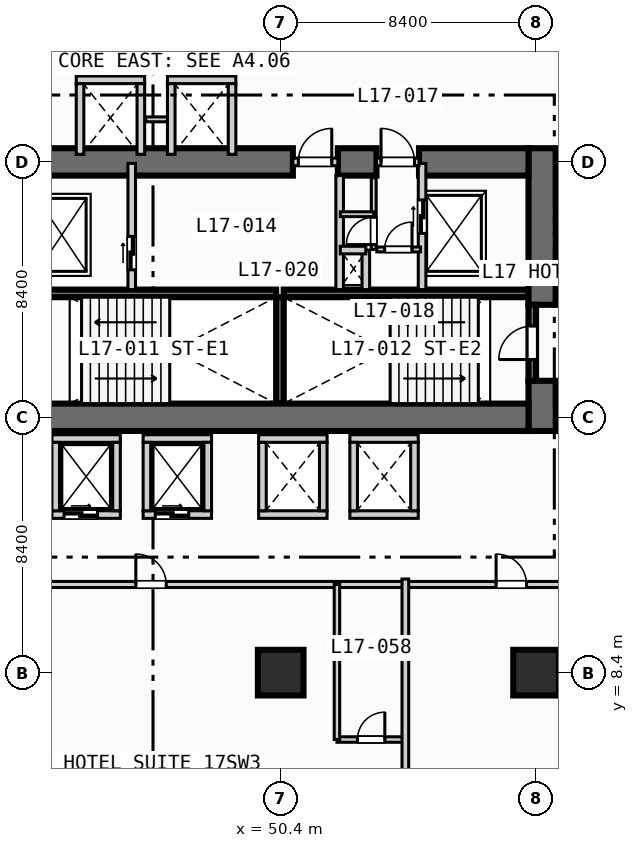
"""IFC4 building model, lengths in metres.
Left out: names, types, materials, properties, quantities, classifications, styles, units other than length and angle.
Written with IfcOpenShell. Run it as: python <this file> out.ifc"""

import sys

from ifc_helpers import new_model, si_unit, direction, frame, frame_2d, origin, origin_2d, place, context, subcontext, project, spatial, rectangle, extrude, element, fill, save


model = new_model("IFC4")
c1 = context("Model", 3, precision=1e-05, world=origin(), true_north=direction((0.0, 1.0)))
c2 = subcontext(c1, "Body", "Model", "MODEL_VIEW")
j1 = project(units=[si_unit("LENGTHUNIT", "METRE"), si_unit("PLANEANGLEUNIT", "RADIAN")], contexts=[c1])
p1 = place(None, origin())
s1 = spatial("IfcSite", under=j1, at=p1, CompositionType="ELEMENT")
p2 = place(p1, origin())
s2 = spatial("IfcBuilding", under=s1, at=p2, CompositionType="ELEMENT")
p3 = place(p2, frame((0.0, 0.0, 73.8)))
s3 = spatial("IfcBuildingStorey", under=s2, at=p3, CompositionType="ELEMENT", Elevation=73.8)
for number, where, z_axis, x_axis in (
    (1, (42.2, 20.875, 0.0), (0.0, 0.0, 1.0), (1.0, 0.0, 0.0)),
    (2, (50.5, 20.875, 0.0), (0.0, 0.0, 1.0), (1.0, 0.0, 0.0)),
):
    element("IfcWall", number, at=place(p3, frame(where, z_axis=z_axis, x_axis=x_axis)), inside=s3, PredefinedType="SOLIDWALL", context=c2, shape_type="SweptSolid", body=[
        extrude(rectangle(XDim=8.05, YDim=0.25, at=frame_2d((4.025, 0.0))), origin(), (0.0, 0.0, 1.0), 3.55),
    ])
p4 = place(p3, frame((50.375, 17.25, 0.0), z_axis=(0.0, 0.0, 1.0), x_axis=(0.0, 1.0, 0.0)))
e3 = element("IfcWall", 3, at=p4, inside=s3, PredefinedType="SOLIDWALL", context=c2, shape_type="SweptSolid", body=[
    extrude(rectangle(XDim=3.5, YDim=0.25, at=frame_2d((1.75, 0.0))), origin(), (0.0, 0.0, 1.0), 3.55),
])
p5 = place(p3, frame((59.0, 16.35, 0.0), z_axis=(0.0, 0.0, 1.0), x_axis=(0.0, 1.0, 0.0)))
e4 = element("IfcWall", 4, at=p5, inside=s3, PredefinedType="SHEAR", context=c2, shape_type="SweptSolid", body=[
    extrude(rectangle(XDim=1.65, YDim=0.9, at=frame_2d((0.825, 0.0))), origin(), (0.0, 0.0, 1.0), 3.55),
])
p6 = place(p3, frame((59.0, 20.5, 0.0), z_axis=(0.0, 0.0, 1.0), x_axis=(0.0, 1.0, 0.0)))
e5 = element("IfcWall", 5, at=p6, inside=s3, PredefinedType="SHEAR", context=c2, shape_type="SweptSolid", body=[
    extrude(rectangle(XDim=5.15, YDim=0.9, at=frame_2d((2.575, 0.0))), origin(), (0.0, 0.0, 1.0), 3.55),
])
p7 = place(p3, frame((42.2, 16.8, 0.0), z_axis=(0.0, 0.0, 1.0), x_axis=(1.0, 0.0, 0.0)))
e6 = element("IfcWall", 6, at=p7, inside=s3, PredefinedType="SHEAR", context=c2, shape_type="SweptSolid", body=[
    extrude(rectangle(XDim=16.35, YDim=0.9, at=frame_2d((8.175, 0.0))), origin(), (0.0, 0.0, 1.0), 3.55),
])
p8 = place(p3, frame((42.2, 25.2, 0.0), z_axis=(0.0, 0.0, 1.0), x_axis=(1.0, 0.0, 0.0)))
e7 = element("IfcWall", 7, at=p8, inside=s3, PredefinedType="SHEAR", context=c2, shape_type="SweptSolid", body=[
    extrude(rectangle(XDim=8.6, YDim=0.9, at=frame_2d((4.3, 0.0))), origin(), (0.0, 0.0, 1.0), 3.55),
])
p9 = place(p3, frame((52.28, 25.2, 0.0), z_axis=(0.0, 0.0, 1.0), x_axis=(1.0, 0.0, 0.0)))
e8 = element("IfcWall", 8, at=p9, inside=s3, PredefinedType="SHEAR", context=c2, shape_type="SweptSolid", body=[
    extrude(rectangle(XDim=1.27, YDim=0.9, at=frame_2d((0.635, 0.0))), origin(), (0.0, 0.0, 1.0), 3.55),
])
p10 = place(p3, frame((54.95, 25.2, 0.0), z_axis=(0.0, 0.0, 1.0), x_axis=(1.0, 0.0, 0.0)))
e9 = element("IfcWall", 9, at=p10, inside=s3, PredefinedType="SHEAR", context=c2, shape_type="SweptSolid", body=[
    extrude(rectangle(XDim=3.6, YDim=0.9, at=frame_2d((1.8, 0.0))), origin(), (0.0, 0.0, 1.0), 3.55),
])
for number, where, z_axis, x_axis in (
    (10, (50.4, 8.4, 0.0), (0.0, 0.0, 1.0), (1.0, 0.0, 0.0)),
    (11, (58.8, 8.4, 0.0), (0.0, 0.0, 1.0), (1.0, 0.0, 0.0)),
):
    element("IfcColumn", number, at=place(p3, frame(where, z_axis=z_axis, x_axis=x_axis)), inside=s3, PredefinedType="COLUMN", context=c2, shape_type="SweptSolid", body=[
        extrude(rectangle(XDim=1.5, YDim=1.5, at=origin_2d()), origin(), (0.0, 0.0, 1.0), 3.8),
    ])
p11 = place(p3, frame((58.675, 18.0, 0.0), z_axis=(0.0, 0.0, 1.0), x_axis=(0.0, 1.0, 0.0)))
e12 = element("IfcWall", 12, at=p11, inside=s3, PredefinedType="SOLIDWALL", context=c2, shape_type="SweptSolid", body=[
    extrude(rectangle(XDim=2.5, YDim=0.25, at=frame_2d((1.25, 0.0))), origin(), (0.0, 0.0, 1.0), 3.55),
])
p12 = place(p11, frame((0.7, 0.0, 0.0)))
e13 = element("IfcOpeningElement", 13, at=p12, cuts=e12, PredefinedType="OPENING", context=c2, shape_type="SweptSolid", body=[
    extrude(rectangle(XDim=1.1, YDim=2.15, at=frame_2d((0.55, 1.075))), frame((0.0, 0.135, 0.0), z_axis=(0.0, -1.0, 0.0), x_axis=(1.0, 0.0, 0.0)), (0.0, 0.0, 1.0), 0.27),
])
p13 = place(p3, frame((45.5, 21.0, 0.0), z_axis=(0.0, 0.0, 1.0), x_axis=(0.0, 1.0, 0.0)))
e14 = element("IfcWall", 14, at=p13, inside=s3, PredefinedType="SOLIDWALL", context=c2, shape_type="SweptSolid", body=[
    extrude(rectangle(XDim=4.15, YDim=0.25, at=frame_2d((2.075, 0.0))), origin(), (0.0, 0.0, 1.0), 3.55),
])
p14 = place(p13, frame((0.65, 0.0, 0.0)))
e15 = element("IfcOpeningElement", 15, at=p14, cuts=e14, PredefinedType="OPENING", context=c2, shape_type="SweptSolid", body=[
    extrude(rectangle(XDim=1.1, YDim=2.15, at=frame_2d((0.55, 1.075))), frame((0.0, 0.135, 0.0), z_axis=(0.0, -1.0, 0.0), x_axis=(1.0, 0.0, 0.0)), (0.0, 0.0, 1.0), 0.27),
])
p15 = place(p3, frame((50.8, 25.2, 0.0), z_axis=(0.0, 0.0, 1.0), x_axis=(1.0, 0.0, 0.0)))
e16 = element("IfcWall", 16, at=p15, inside=s3, PredefinedType="SOLIDWALL", context=c2, shape_type="SweptSolid", body=[
    extrude(rectangle(XDim=1.48, YDim=0.25, at=frame_2d((0.74, 0.0))), origin(), (0.0, 0.0, 1.0), 3.55),
])
p16 = place(p15, frame((0.18, 0.0, 0.0)))
e17 = element("IfcOpeningElement", 17, at=p16, cuts=e16, PredefinedType="OPENING", context=c2, shape_type="SweptSolid", body=[
    extrude(rectangle(XDim=1.1, YDim=2.15, at=frame_2d((0.55, 1.075))), frame((0.0, 0.135, 0.0), z_axis=(0.0, -1.0, 0.0), x_axis=(1.0, 0.0, 0.0)), (0.0, 0.0, 1.0), 0.27),
])
p17 = place(p3, frame((52.34, 21.0, 0.0), z_axis=(0.0, 0.0, 1.0), x_axis=(0.0, 1.0, 0.0)))
e18 = element("IfcWall", 18, at=p17, inside=s3, PredefinedType="SOLIDWALL", context=c2, shape_type="SweptSolid", body=[
    extrude(rectangle(XDim=3.75, YDim=0.25, at=frame_2d((1.875, 0.0))), origin(), (0.0, 0.0, 1.0), 3.55),
])
p18 = place(p3, frame((55.05, 21.0, 0.0), z_axis=(0.0, 0.0, 1.0), x_axis=(0.0, 1.0, 0.0)))
e19 = element("IfcWall", 19, at=p18, inside=s3, PredefinedType="SOLIDWALL", context=c2, shape_type="SweptSolid", body=[
    extrude(rectangle(XDim=4.15, YDim=0.25, at=frame_2d((2.075, 0.0))), origin(), (0.0, 0.0, 1.0), 3.55),
])
p19 = place(p18, frame((1.85, 0.0, 0.0)))
e20 = element("IfcOpeningElement", 20, at=p19, cuts=e19, PredefinedType="OPENING", context=c2, shape_type="SweptSolid", body=[
    extrude(rectangle(XDim=1.1, YDim=2.15, at=frame_2d((0.55, 1.075))), frame((0.0, 0.135, 0.0), z_axis=(0.0, -1.0, 0.0), x_axis=(1.0, 0.0, 0.0)), (0.0, 0.0, 1.0), 0.27),
])
p20 = place(p3, frame((53.55, 25.2, 0.0), z_axis=(0.0, 0.0, 1.0), x_axis=(1.0, 0.0, 0.0)))
e21 = element("IfcWall", 21, at=p20, inside=s3, PredefinedType="SOLIDWALL", context=c2, shape_type="SweptSolid", body=[
    extrude(rectangle(XDim=1.4, YDim=0.25, at=frame_2d((0.7, 0.0))), origin(), (0.0, 0.0, 1.0), 3.55),
])
p21 = place(p20, frame((0.15, 0.0, 0.0)))
e22 = element("IfcOpeningElement", 22, at=p21, cuts=e21, PredefinedType="OPENING", context=c2, shape_type="SweptSolid", body=[
    extrude(rectangle(XDim=1.1, YDim=2.15, at=frame_2d((0.55, 1.075))), frame((0.0, 0.135, 0.0), z_axis=(0.0, -1.0, 0.0), x_axis=(1.0, 0.0, 0.0)), (0.0, 0.0, 1.0), 0.27),
])
p22 = place(p3, frame((53.2, 21.0, 0.0), z_axis=(0.0, 0.0, 1.0), x_axis=(0.0, 1.0, 0.0)))
e23 = element("IfcWall", 23, at=p22, inside=s3, PredefinedType="SOLIDWALL", context=c2, shape_type="SweptSolid", body=[
    extrude(rectangle(XDim=1.3, YDim=0.25, at=frame_2d((0.65, 0.0))), origin(), (0.0, 0.0, 1.0), 3.55),
])
p23 = place(p3, frame((52.36, 22.3, 0.0), z_axis=(0.0, 0.0, 1.0), x_axis=(1.0, 0.0, 0.0)))
e24 = element("IfcWall", 24, at=p23, inside=s3, PredefinedType="SOLIDWALL", context=c2, shape_type="SweptSolid", body=[
    extrude(rectangle(XDim=0.84, YDim=0.25, at=frame_2d((0.42, 0.0))), origin(), (0.0, 0.0, 1.0), 3.55),
])
p24 = place(p3, frame((53.56, 22.32, 0.0), z_axis=(0.0, 0.0, 1.0), x_axis=(1.0, 0.0, 0.0)))
e25 = element("IfcWall", 25, at=p24, inside=s3, PredefinedType="PARTITIONING", context=c2, shape_type="SweptSolid", body=[
    extrude(rectangle(XDim=1.44, YDim=0.16, at=frame_2d((0.72, 0.0))), origin(), (0.0, 0.0, 1.0), 3.55),
])
p25 = place(p24, frame((0.26, 0.0, 0.0)))
e26 = element("IfcOpeningElement", 26, at=p25, cuts=e25, PredefinedType="OPENING", context=c2, shape_type="SweptSolid", body=[
    extrude(rectangle(XDim=0.9, YDim=2.1, at=frame_2d((0.45, 1.05))), frame((0.0, 0.09, 0.0), z_axis=(0.0, -1.0, 0.0), x_axis=(1.0, 0.0, 0.0)), (0.0, 0.0, 1.0), 0.18),
])
p26 = place(p3, frame((53.46, 22.32, 0.0), z_axis=(0.0, 0.0, 1.0), x_axis=(0.0, 1.0, 0.0)))
e27 = element("IfcWall", 27, at=p26, inside=s3, PredefinedType="PARTITIONING", context=c2, shape_type="SweptSolid", body=[
    extrude(rectangle(XDim=2.36, YDim=0.16, at=frame_2d((1.18, 0.0))), origin(), (0.0, 0.0, 1.0), 3.55),
])
p27 = place(p26, frame((0.16, 0.0, 0.0)))
e28 = element("IfcOpeningElement", 28, at=p27, cuts=e27, PredefinedType="OPENING", context=c2, shape_type="SweptSolid", body=[
    extrude(rectangle(XDim=0.9, YDim=2.1, at=frame_2d((0.45, 1.05))), frame((0.0, 0.09, 0.0), z_axis=(0.0, -1.0, 0.0), x_axis=(1.0, 0.0, 0.0)), (0.0, 0.0, 1.0), 0.18),
])
p28 = place(p3, frame((52.36, 23.48, 0.0), z_axis=(0.0, 0.0, 1.0), x_axis=(1.0, 0.0, 0.0)))
e29 = element("IfcWall", 29, at=p28, inside=s3, PredefinedType="PARTITIONING", context=c2, shape_type="SweptSolid", body=[
    extrude(rectangle(XDim=1.1, YDim=0.16, at=frame_2d((0.55, 0.0))), origin(), (0.0, 0.0, 1.0), 3.55),
])
p29 = place(p3, frame((42.875, 13.6, 0.0), z_axis=(0.0, 0.0, 1.0), x_axis=(1.0, 0.0, 0.0)))
e30 = element("IfcWall", 30, at=p29, inside=s3, PredefinedType="SOLIDWALL", context=c2, shape_type="SweptSolid", body=[
    extrude(rectangle(XDim=2.25, YDim=0.25, at=frame_2d((1.125, 0.0))), origin(), (0.0, 0.0, 1.0), 3.55),
])
p30 = place(p29, frame((0.4, 0.0, 0.0)))
e31 = element("IfcOpeningElement", 31, at=p30, cuts=e30, PredefinedType="OPENING", context=c2, shape_type="SweptSolid", body=[
    extrude(rectangle(XDim=1.1, YDim=2.15, at=frame_2d((0.55, 1.075))), frame((0.0, 0.135, 0.0), z_axis=(0.0, -1.0, 0.0), x_axis=(1.0, 0.0, 0.0)), (0.0, 0.0, 1.0), 0.27),
])
for number, where, z_axis, x_axis in (
    (32, (42.875, 16.1, 0.0), (0.0, 0.0, 1.0), (1.0, 0.0, 0.0)),
    (33, (43.0, 13.725, 0.0), (0.0, 0.0, 1.0), (0.0, 1.0, 0.0)),
    (34, (45.0, 13.725, 0.0), (0.0, 0.0, 1.0), (0.0, 1.0, 0.0)),
):
    element("IfcWall", number, at=place(p3, frame(where, z_axis=z_axis, x_axis=x_axis)), inside=s3, PredefinedType="SOLIDWALL", context=c2, shape_type="SweptSolid", body=[
        extrude(rectangle(XDim=2.25, YDim=0.25, at=frame_2d((1.125, 0.0))), origin(), (0.0, 0.0, 1.0), 3.55),
    ])
p31 = place(p3, frame((45.875, 13.6, 0.0), z_axis=(0.0, 0.0, 1.0), x_axis=(1.0, 0.0, 0.0)))
e35 = element("IfcWall", 35, at=p31, inside=s3, PredefinedType="SOLIDWALL", context=c2, shape_type="SweptSolid", body=[
    extrude(rectangle(XDim=2.25, YDim=0.25, at=frame_2d((1.125, 0.0))), origin(), (0.0, 0.0, 1.0), 3.55),
])
p32 = place(p31, frame((0.4, 0.0, 0.0)))
e36 = element("IfcOpeningElement", 36, at=p32, cuts=e35, PredefinedType="OPENING", context=c2, shape_type="SweptSolid", body=[
    extrude(rectangle(XDim=1.1, YDim=2.15, at=frame_2d((0.55, 1.075))), frame((0.0, 0.135, 0.0), z_axis=(0.0, -1.0, 0.0), x_axis=(1.0, 0.0, 0.0)), (0.0, 0.0, 1.0), 0.27),
])
for number, where, z_axis, x_axis in (
    (37, (45.875, 16.1, 0.0), (0.0, 0.0, 1.0), (1.0, 0.0, 0.0)),
    (38, (46.0, 13.725, 0.0), (0.0, 0.0, 1.0), (0.0, 1.0, 0.0)),
    (39, (48.0, 13.725, 0.0), (0.0, 0.0, 1.0), (0.0, 1.0, 0.0)),
    (40, (49.675, 13.6, 0.0), (0.0, 0.0, 1.0), (1.0, 0.0, 0.0)),
    (41, (49.675, 16.1, 0.0), (0.0, 0.0, 1.0), (1.0, 0.0, 0.0)),
    (42, (49.8, 13.725, 0.0), (0.0, 0.0, 1.0), (0.0, 1.0, 0.0)),
    (43, (51.8, 13.725, 0.0), (0.0, 0.0, 1.0), (0.0, 1.0, 0.0)),
    (44, (52.675, 13.6, 0.0), (0.0, 0.0, 1.0), (1.0, 0.0, 0.0)),
    (45, (52.675, 16.1, 0.0), (0.0, 0.0, 1.0), (1.0, 0.0, 0.0)),
    (46, (52.8, 13.725, 0.0), (0.0, 0.0, 1.0), (0.0, 1.0, 0.0)),
    (47, (54.8, 13.725, 0.0), (0.0, 0.0, 1.0), (0.0, 1.0, 0.0)),
    (48, (43.675, 27.9, 0.0), (0.0, 0.0, 1.0), (1.0, 0.0, 0.0)),
):
    element("IfcWall", number, at=place(p3, frame(where, z_axis=z_axis, x_axis=x_axis)), inside=s3, PredefinedType="SOLIDWALL", context=c2, shape_type="SweptSolid", body=[
        extrude(rectangle(XDim=2.25, YDim=0.25, at=frame_2d((1.125, 0.0))), origin(), (0.0, 0.0, 1.0), 3.55),
    ])
for number, where, z_axis, x_axis in (
    (49, (43.8, 25.45, 0.0), (0.0, 0.0, 1.0), (0.0, 1.0, 0.0)),
    (50, (45.8, 25.45, 0.0), (0.0, 0.0, 1.0), (0.0, 1.0, 0.0)),
):
    element("IfcWall", number, at=place(p3, frame(where, z_axis=z_axis, x_axis=x_axis)), inside=s3, PredefinedType="SOLIDWALL", context=c2, shape_type="SweptSolid", body=[
        extrude(rectangle(XDim=2.325, YDim=0.25, at=frame_2d((1.163, 0.0))), origin(), (0.0, 0.0, 1.0), 3.55),
    ])
p33 = place(p3, frame((45.96, 26.6, 0.0), z_axis=(0.0, 0.0, 1.0), x_axis=(1.0, 0.0, 0.0)))
e51 = element("IfcWall", 51, at=p33, inside=s3, PredefinedType="PARTITIONING", context=c2, shape_type="SweptSolid", body=[
    extrude(rectangle(XDim=0.88, YDim=0.16, at=frame_2d((0.44, 0.0))), origin(), (0.0, 0.0, 1.0), 3.55),
])
p34 = place(p3, frame((46.675, 27.9, 0.0), z_axis=(0.0, 0.0, 1.0), x_axis=(1.0, 0.0, 0.0)))
e52 = element("IfcWall", 52, at=p34, inside=s3, PredefinedType="SOLIDWALL", context=c2, shape_type="SweptSolid", body=[
    extrude(rectangle(XDim=2.25, YDim=0.25, at=frame_2d((1.125, 0.0))), origin(), (0.0, 0.0, 1.0), 3.55),
])
for number, where, z_axis, x_axis in (
    (53, (46.8, 25.45, 0.0), (0.0, 0.0, 1.0), (0.0, 1.0, 0.0)),
    (54, (48.8, 25.45, 0.0), (0.0, 0.0, 1.0), (0.0, 1.0, 0.0)),
):
    element("IfcWall", number, at=place(p3, frame(where, z_axis=z_axis, x_axis=x_axis)), inside=s3, PredefinedType="SOLIDWALL", context=c2, shape_type="SweptSolid", body=[
        extrude(rectangle(XDim=2.325, YDim=0.25, at=frame_2d((1.163, 0.0))), origin(), (0.0, 0.0, 1.0), 3.55),
    ])
p35 = place(p3, frame((13.7, 11.3, 0.0), z_axis=(0.0, 0.0, 1.0), x_axis=(1.0, 0.0, 0.0)))
e55 = element("IfcWall", 55, at=p35, inside=s3, PredefinedType="PARTITIONING", context=c2, shape_type="SweptSolid", body=[
    extrude(rectangle(XDim=50.1, YDim=0.2, at=frame_2d((25.05, 0.0))), origin(), (0.0, 0.0, 1.0), 3.55),
])
p36 = place(p35, frame((3.61, 0.0, 0.0)))
e56 = element("IfcOpeningElement", 56, at=p36, cuts=e55, PredefinedType="OPENING", context=c2, shape_type="SweptSolid", body=[
    extrude(rectangle(XDim=1.0, YDim=2.15, at=frame_2d((0.5, 1.075))), frame((0.0, 0.11, 0.0), z_axis=(0.0, -1.0, 0.0), x_axis=(1.0, 0.0, 0.0)), (0.0, 0.0, 1.0), 0.22),
])
p37 = place(p35, frame((16.81, 0.0, 0.0)))
e57 = element("IfcOpeningElement", 57, at=p37, cuts=e55, PredefinedType="OPENING", context=c2, shape_type="SweptSolid", body=[
    extrude(rectangle(XDim=1.0, YDim=2.15, at=frame_2d((0.5, 1.075))), frame((0.0, 0.11, 0.0), z_axis=(0.0, -1.0, 0.0), x_axis=(1.0, 0.0, 0.0)), (0.0, 0.0, 1.0), 0.22),
])
p38 = place(p35, frame((31.935, 0.0, 0.0)))
e58 = element("IfcOpeningElement", 58, at=p38, cuts=e55, PredefinedType="OPENING", context=c2, shape_type="SweptSolid", body=[
    extrude(rectangle(XDim=1.0, YDim=2.15, at=frame_2d((0.5, 1.075))), frame((0.0, 0.11, 0.0), z_axis=(0.0, -1.0, 0.0), x_axis=(1.0, 0.0, 0.0)), (0.0, 0.0, 1.0), 0.22),
])
p39 = place(p35, frame((43.785, 0.0, 0.0)))
e59 = element("IfcOpeningElement", 59, at=p39, cuts=e55, PredefinedType="OPENING", context=c2, shape_type="SweptSolid", body=[
    extrude(rectangle(XDim=1.0, YDim=2.15, at=frame_2d((0.5, 1.075))), frame((0.0, 0.11, 0.0), z_axis=(0.0, -1.0, 0.0), x_axis=(1.0, 0.0, 0.0)), (0.0, 0.0, 1.0), 0.22),
])
p40 = place(p3, frame((52.25, 6.2, 0.0), z_axis=(0.0, 0.0, 1.0), x_axis=(1.0, 0.0, 0.0)))
e60 = element("IfcWall", 60, at=p40, inside=s3, PredefinedType="PLUMBINGWALL", context=c2, shape_type="SweptSolid", body=[
    extrude(rectangle(XDim=2.25, YDim=0.18, at=frame_2d((1.125, 0.0))), origin(), (0.0, 0.0, 1.0), 3.55),
])
p41 = place(p40, frame((0.675, 0.0, 0.0)))
e61 = element("IfcOpeningElement", 61, at=p41, cuts=e60, PredefinedType="OPENING", context=c2, shape_type="SweptSolid", body=[
    extrude(rectangle(XDim=0.9, YDim=2.1, at=frame_2d((0.45, 1.05))), frame((0.0, 0.1, 0.0), z_axis=(0.0, -1.0, 0.0), x_axis=(1.0, 0.0, 0.0)), (0.0, 0.0, 1.0), 0.2),
])
p42 = place(p3, frame((52.25, 6.2, 0.0), z_axis=(0.0, 0.0, 1.0), x_axis=(0.0, 1.0, 0.0)))
e62 = element("IfcWall", 62, at=p42, inside=s3, PredefinedType="PLUMBINGWALL", context=c2, shape_type="SweptSolid", body=[
    extrude(rectangle(XDim=5.1, YDim=0.18, at=frame_2d((2.55, 0.0))), origin(), (0.0, 0.0, 1.0), 3.55),
])
p43 = place(p3, frame((54.5, 0.2, 0.0), z_axis=(0.0, 0.0, 1.0), x_axis=(0.0, 1.0, 0.0)))
e63 = element("IfcWall", 63, at=p43, inside=s3, PredefinedType="PARTITIONING", context=c2, shape_type="SweptSolid", body=[
    extrude(rectangle(XDim=11.28, YDim=0.22, at=frame_2d((5.64, 0.0))), origin(), (0.0, 0.0, 1.0), 3.55),
])
p44 = place(p12, origin())
e64 = element("IfcDoor", 64, at=p44, inside=s3, OperationType="SINGLE_SWING_LEFT", PredefinedType="DOOR", context=c2, shape_type="SweptSolid", body=[
    extrude(rectangle(XDim=1.1, YDim=2.15, at=frame_2d((0.55, 1.075))), frame((0.0, 0.025, 0.0), z_axis=(0.0, -1.0, 0.0), x_axis=(1.0, 0.0, 0.0)), (0.0, 0.0, 1.0), 0.05),
])
fill(e13, e64)
p45 = place(p14, origin())
e65 = element("IfcDoor", 65, at=p45, inside=s3, OperationType="SLIDING_TO_LEFT", PredefinedType="DOOR", context=c2, shape_type="SweptSolid", body=[
    extrude(rectangle(XDim=1.1, YDim=2.15, at=frame_2d((0.55, 1.075))), frame((0.0, 0.025, 0.0), z_axis=(0.0, -1.0, 0.0), x_axis=(1.0, 0.0, 0.0)), (0.0, 0.0, 1.0), 0.05),
])
fill(e15, e65)
p46 = place(p16, origin())
e66 = element("IfcDoor", 66, at=p46, inside=s3, OperationType="SINGLE_SWING_RIGHT", PredefinedType="DOOR", context=c2, shape_type="SweptSolid", body=[
    extrude(rectangle(XDim=1.1, YDim=2.15, at=frame_2d((0.55, 1.075))), frame((0.0, 0.025, 0.0), z_axis=(0.0, -1.0, 0.0), x_axis=(1.0, 0.0, 0.0)), (0.0, 0.0, 1.0), 0.05),
])
fill(e17, e66)
p47 = place(p19, origin())
e67 = element("IfcDoor", 67, at=p47, inside=s3, OperationType="SLIDING_TO_LEFT", PredefinedType="DOOR", context=c2, shape_type="SweptSolid", body=[
    extrude(rectangle(XDim=1.1, YDim=2.15, at=frame_2d((0.55, 1.075))), frame((0.0, 0.025, 0.0), z_axis=(0.0, -1.0, 0.0), x_axis=(1.0, 0.0, 0.0)), (0.0, 0.0, 1.0), 0.05),
])
fill(e20, e67)
p48 = place(p21, origin())
e68 = element("IfcDoor", 68, at=p48, inside=s3, OperationType="SINGLE_SWING_LEFT", PredefinedType="DOOR", context=c2, shape_type="SweptSolid", body=[
    extrude(rectangle(XDim=1.1, YDim=2.15, at=frame_2d((0.55, 1.075))), frame((0.0, 0.025, 0.0), z_axis=(0.0, -1.0, 0.0), x_axis=(1.0, 0.0, 0.0)), (0.0, 0.0, 1.0), 0.05),
])
fill(e22, e68)
p49 = place(p25, origin())
e69 = element("IfcDoor", 69, at=p49, inside=s3, OperationType="SINGLE_SWING_RIGHT", PredefinedType="DOOR", context=c2, shape_type="SweptSolid", body=[
    extrude(rectangle(XDim=0.9, YDim=2.1, at=frame_2d((0.45, 1.05))), frame((0.0, 0.025, 0.0), z_axis=(0.0, -1.0, 0.0), x_axis=(1.0, 0.0, 0.0)), (0.0, 0.0, 1.0), 0.05),
])
fill(e26, e69)
p50 = place(p27, origin())
e70 = element("IfcDoor", 70, at=p50, inside=s3, OperationType="SINGLE_SWING_LEFT", PredefinedType="DOOR", context=c2, shape_type="SweptSolid", body=[
    extrude(rectangle(XDim=0.9, YDim=2.1, at=frame_2d((0.45, 1.05))), frame((0.0, 0.025, 0.0), z_axis=(0.0, -1.0, 0.0), x_axis=(1.0, 0.0, 0.0)), (0.0, 0.0, 1.0), 0.05),
])
fill(e28, e70)
p51 = place(p30, origin())
e71 = element("IfcDoor", 71, at=p51, inside=s3, OperationType="SLIDING_TO_LEFT", PredefinedType="DOOR", context=c2, shape_type="SweptSolid", body=[
    extrude(rectangle(XDim=1.1, YDim=2.15, at=frame_2d((0.55, 1.075))), frame((0.0, 0.025, 0.0), z_axis=(0.0, -1.0, 0.0), x_axis=(1.0, 0.0, 0.0)), (0.0, 0.0, 1.0), 0.05),
])
fill(e31, e71)
p52 = place(p32, origin())
e72 = element("IfcDoor", 72, at=p52, inside=s3, OperationType="SLIDING_TO_LEFT", PredefinedType="DOOR", context=c2, shape_type="SweptSolid", body=[
    extrude(rectangle(XDim=1.1, YDim=2.15, at=frame_2d((0.55, 1.075))), frame((0.0, 0.025, 0.0), z_axis=(0.0, -1.0, 0.0), x_axis=(1.0, 0.0, 0.0)), (0.0, 0.0, 1.0), 0.05),
])
fill(e36, e72)
p53 = place(p38, origin())
e73 = element("IfcDoor", 73, at=p53, inside=s3, OperationType="SINGLE_SWING_LEFT", PredefinedType="DOOR", context=c2, shape_type="SweptSolid", body=[
    extrude(rectangle(XDim=1.0, YDim=2.15, at=frame_2d((0.5, 1.075))), frame((0.0, 0.025, 0.0), z_axis=(0.0, -1.0, 0.0), x_axis=(1.0, 0.0, 0.0)), (0.0, 0.0, 1.0), 0.05),
])
fill(e58, e73)
p54 = place(p39, origin())
e74 = element("IfcDoor", 74, at=p54, inside=s3, OperationType="SINGLE_SWING_LEFT", PredefinedType="DOOR", context=c2, shape_type="SweptSolid", body=[
    extrude(rectangle(XDim=1.0, YDim=2.15, at=frame_2d((0.5, 1.075))), frame((0.0, 0.025, 0.0), z_axis=(0.0, -1.0, 0.0), x_axis=(1.0, 0.0, 0.0)), (0.0, 0.0, 1.0), 0.05),
])
fill(e59, e74)
p55 = place(p41, origin())
e75 = element("IfcDoor", 75, at=p55, inside=s3, OperationType="SINGLE_SWING_RIGHT", PredefinedType="DOOR", context=c2, shape_type="SweptSolid", body=[
    extrude(rectangle(XDim=0.9, YDim=2.1, at=frame_2d((0.45, 1.05))), frame((0.0, 0.025, 0.0), z_axis=(0.0, -1.0, 0.0), x_axis=(1.0, 0.0, 0.0)), (0.0, 0.0, 1.0), 0.05),
])
fill(e61, e75)
save(model, sys.argv[1])
